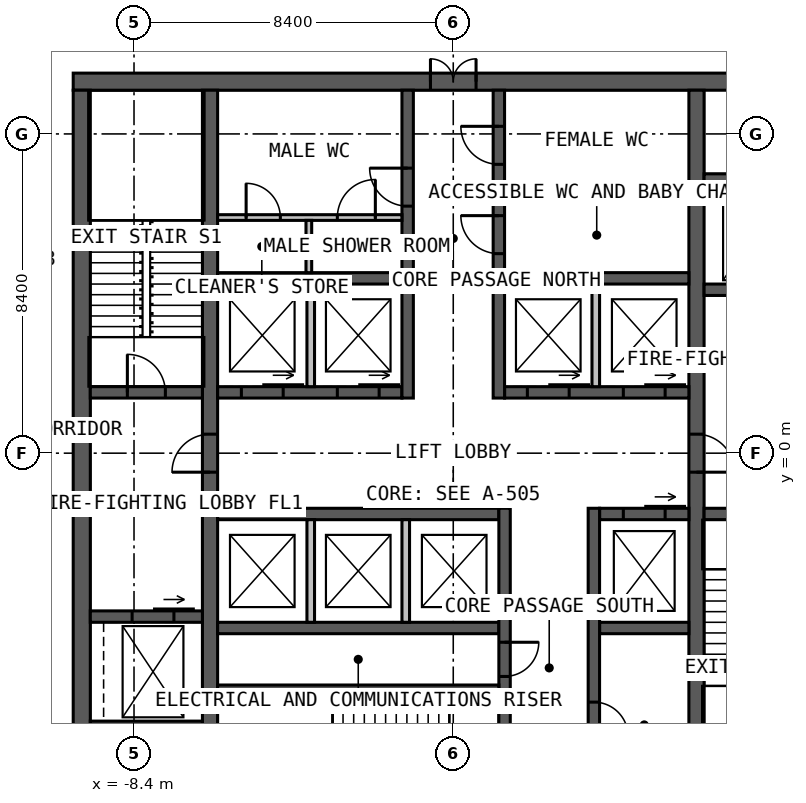
"""IFC4 building model, lengths in metres.
Left out: names, types, materials, properties, quantities, classifications, styles, units other than length and angle.
Written with IfcOpenShell. Run it as: python <this file> out.ifc"""

import sys

from ifc_helpers import new_model, si_unit, direction, frame, frame_2d, origin, place, context, subcontext, project, spatial, rectangle, extrude, element, fill, save


model = new_model("IFC4")
c1 = context("Model", 3, precision=1e-05, world=origin(), true_north=direction((0.0, 1.0)))
c2 = subcontext(c1, "Body", "Model", "MODEL_VIEW")
j1 = project(units=[si_unit("LENGTHUNIT", "METRE"), si_unit("PLANEANGLEUNIT", "RADIAN")], contexts=[c1])
p1 = place(None, origin())
s1 = spatial("IfcSite", under=j1, at=p1, CompositionType="ELEMENT")
p2 = place(p1, origin())
s2 = spatial("IfcBuilding", under=s1, at=p2, CompositionType="ELEMENT")
p3 = place(p2, frame((0.0, 0.0, 163.0)))
s3 = spatial("IfcBuildingStorey", under=s2, at=p3, CompositionType="ELEMENT", Elevation=163.0)
p4 = place(p3, frame((-10.0, 9.775, 0.0), z_axis=(0.0, 0.0, 1.0), x_axis=(1.0, 0.0, 0.0)))
e1 = element("IfcWall", 1, at=p4, inside=s3, PredefinedType="SOLIDWALL", context=c2, shape_type="SweptSolid", body=[
    extrude(rectangle(XDim=20.0, YDim=0.45, at=frame_2d((10.0, 0.0))), origin(), (0.0, 0.0, 1.0), 4.0),
])
p5 = place(p4, frame((9.4, 0.0, 0.0)))
e2 = element("IfcOpeningElement", 2, at=p5, cuts=e1, PredefinedType="OPENING", context=c2, shape_type="SweptSolid", body=[
    extrude(rectangle(XDim=1.2, YDim=2.2, at=frame_2d((0.6, 1.1))), frame((0.0, 0.235, 0.0), z_axis=(0.0, -1.0, 0.0), x_axis=(1.0, 0.0, 0.0)), (0.0, 0.0, 1.0), 0.47),
])
p6 = place(p3, frame((-9.775, 9.55, 0.0), z_axis=(0.0, 0.0, 1.0), x_axis=(0.0, -1.0, 0.0)))
e3 = element("IfcWall", 3, at=p6, inside=s3, PredefinedType="SOLIDWALL", context=c2, shape_type="SweptSolid", body=[
    extrude(rectangle(XDim=19.1, YDim=0.45, at=frame_2d((9.55, 0.0))), origin(), (0.0, 0.0, 1.0), 4.0),
])
p7 = place(p3, frame((-6.4, -9.55, 0.0), z_axis=(0.0, 0.0, 1.0), x_axis=(0.0, 1.0, 0.0)))
e4 = element("IfcWall", 4, at=p7, inside=s3, PredefinedType="SOLIDWALL", context=c2, shape_type="SweptSolid", body=[
    extrude(rectangle(XDim=19.1, YDim=0.4, at=frame_2d((9.55, 0.0))), origin(), (0.0, 0.0, 1.0), 4.0),
])
p8 = place(p7, frame((9.05, 0.0, 0.0)))
e5 = element("IfcOpeningElement", 5, at=p8, cuts=e4, PredefinedType="OPENING", context=c2, shape_type="SweptSolid", body=[
    extrude(rectangle(XDim=1.0, YDim=2.2, at=frame_2d((0.5, 1.1))), frame((0.0, 0.21, 0.0), z_axis=(0.0, -1.0, 0.0), x_axis=(1.0, 0.0, 0.0)), (0.0, 0.0, 1.0), 0.42),
])
p9 = place(p3, frame((6.4, 9.55, 0.0), z_axis=(0.0, 0.0, 1.0), x_axis=(0.0, -1.0, 0.0)))
e6 = element("IfcWall", 6, at=p9, inside=s3, PredefinedType="SOLIDWALL", context=c2, shape_type="SweptSolid", body=[
    extrude(rectangle(XDim=19.1, YDim=0.4, at=frame_2d((9.55, 0.0))), origin(), (0.0, 0.0, 1.0), 4.0),
])
p10 = place(p9, frame((9.05, 0.0, 0.0)))
e7 = element("IfcOpeningElement", 7, at=p10, cuts=e6, PredefinedType="OPENING", context=c2, shape_type="SweptSolid", body=[
    extrude(rectangle(XDim=1.0, YDim=2.2, at=frame_2d((0.5, 1.1))), frame((0.0, 0.21, 0.0), z_axis=(0.0, -1.0, 0.0), x_axis=(1.0, 0.0, 0.0)), (0.0, 0.0, 1.0), 0.42),
])
p11 = place(p3, frame((-6.2, 1.6, 0.0), z_axis=(0.0, 0.0, 1.0), x_axis=(1.0, 0.0, 0.0)))
e8 = element("IfcWall", 8, at=p11, inside=s3, PredefinedType="SOLIDWALL", context=c2, shape_type="SweptSolid", body=[
    extrude(rectangle(XDim=4.85, YDim=0.3, at=frame_2d((2.425, 0.0))), origin(), (0.0, 0.0, 1.0), 4.0),
])
p12 = place(p11, frame((0.625, 0.0, 0.0)))
e9 = element("IfcOpeningElement", 9, at=p12, cuts=e8, PredefinedType="OPENING", context=c2, shape_type="SweptSolid", body=[
    extrude(rectangle(XDim=1.1, YDim=2.2, at=frame_2d((0.55, 1.1))), frame((0.0, 0.16, 0.0), z_axis=(0.0, -1.0, 0.0), x_axis=(1.0, 0.0, 0.0)), (0.0, 0.0, 1.0), 0.32),
])
p13 = place(p11, frame((3.15, 0.0, 0.0)))
e10 = element("IfcOpeningElement", 10, at=p13, cuts=e8, PredefinedType="OPENING", context=c2, shape_type="SweptSolid", body=[
    extrude(rectangle(XDim=1.1, YDim=2.2, at=frame_2d((0.55, 1.1))), frame((0.0, 0.16, 0.0), z_axis=(0.0, -1.0, 0.0), x_axis=(1.0, 0.0, 0.0)), (0.0, 0.0, 1.0), 0.32),
])
p14 = place(p3, frame((1.35, 1.6, 0.0), z_axis=(0.0, 0.0, 1.0), x_axis=(1.0, 0.0, 0.0)))
e11 = element("IfcWall", 11, at=p14, inside=s3, PredefinedType="SOLIDWALL", context=c2, shape_type="SweptSolid", body=[
    extrude(rectangle(XDim=4.85, YDim=0.3, at=frame_2d((2.425, 0.0))), origin(), (0.0, 0.0, 1.0), 4.0),
])
p15 = place(p14, frame((0.6, 0.0, 0.0)))
e12 = element("IfcOpeningElement", 12, at=p15, cuts=e11, PredefinedType="OPENING", context=c2, shape_type="SweptSolid", body=[
    extrude(rectangle(XDim=1.1, YDim=2.2, at=frame_2d((0.55, 1.1))), frame((0.0, 0.16, 0.0), z_axis=(0.0, -1.0, 0.0), x_axis=(1.0, 0.0, 0.0)), (0.0, 0.0, 1.0), 0.32),
])
p16 = place(p14, frame((3.125, 0.0, 0.0)))
e13 = element("IfcOpeningElement", 13, at=p16, cuts=e11, PredefinedType="OPENING", context=c2, shape_type="SweptSolid", body=[
    extrude(rectangle(XDim=1.1, YDim=2.2, at=frame_2d((0.55, 1.1))), frame((0.0, 0.16, 0.0), z_axis=(0.0, -1.0, 0.0), x_axis=(1.0, 0.0, 0.0)), (0.0, 0.0, 1.0), 0.32),
])
for number, where, z_axis, x_axis in (
    (14, (-6.2, 4.6, 0.0), (0.0, 0.0, 1.0), (1.0, 0.0, 0.0)),
    (15, (1.35, 4.6, 0.0), (0.0, 0.0, 1.0), (1.0, 0.0, 0.0)),
):
    element("IfcWall", number, at=place(p3, frame(where, z_axis=z_axis, x_axis=x_axis)), inside=s3, PredefinedType="SOLIDWALL", context=c2, shape_type="SweptSolid", body=[
        extrude(rectangle(XDim=4.85, YDim=0.3, at=frame_2d((2.425, 0.0))), origin(), (0.0, 0.0, 1.0), 4.0),
    ])
p17 = place(p3, frame((-1.2, 1.45, 0.0), z_axis=(0.0, 0.0, 1.0), x_axis=(0.0, 1.0, 0.0)))
e16 = element("IfcWall", 16, at=p17, inside=s3, PredefinedType="SOLIDWALL", context=c2, shape_type="SweptSolid", body=[
    extrude(rectangle(XDim=8.1, YDim=0.3, at=frame_2d((4.05, 0.0))), origin(), (0.0, 0.0, 1.0), 4.0),
])
p18 = place(p17, frame((5.05, 0.0, 0.0)))
e17 = element("IfcOpeningElement", 17, at=p18, cuts=e16, PredefinedType="OPENING", context=c2, shape_type="SweptSolid", body=[
    extrude(rectangle(XDim=1.0, YDim=2.2, at=frame_2d((0.5, 1.1))), frame((0.0, 0.16, 0.0), z_axis=(0.0, -1.0, 0.0), x_axis=(1.0, 0.0, 0.0)), (0.0, 0.0, 1.0), 0.32),
])
p19 = place(p3, frame((1.2, 1.45, 0.0), z_axis=(0.0, 0.0, 1.0), x_axis=(0.0, 1.0, 0.0)))
e18 = element("IfcWall", 18, at=p19, inside=s3, PredefinedType="SOLIDWALL", context=c2, shape_type="SweptSolid", body=[
    extrude(rectangle(XDim=8.1, YDim=0.3, at=frame_2d((4.05, 0.0))), origin(), (0.0, 0.0, 1.0), 4.0),
])
p20 = place(p19, frame((3.8, 0.0, 0.0)))
e19 = element("IfcOpeningElement", 19, at=p20, cuts=e18, PredefinedType="OPENING", context=c2, shape_type="SweptSolid", body=[
    extrude(rectangle(XDim=1.0, YDim=2.2, at=frame_2d((0.5, 1.1))), frame((0.0, 0.16, 0.0), z_axis=(0.0, -1.0, 0.0), x_axis=(1.0, 0.0, 0.0)), (0.0, 0.0, 1.0), 0.32),
])
p21 = place(p19, frame((6.15, 0.0, 0.0)))
e20 = element("IfcOpeningElement", 20, at=p21, cuts=e18, PredefinedType="OPENING", context=c2, shape_type="SweptSolid", body=[
    extrude(rectangle(XDim=1.0, YDim=2.2, at=frame_2d((0.5, 1.1))), frame((0.0, 0.16, 0.0), z_axis=(0.0, -1.0, 0.0), x_axis=(1.0, 0.0, 0.0)), (0.0, 0.0, 1.0), 0.32),
])
p22 = place(p3, frame((-6.2, -1.6, 0.0), z_axis=(0.0, 0.0, 1.0), x_axis=(1.0, 0.0, 0.0)))
e21 = element("IfcWall", 21, at=p22, inside=s3, PredefinedType="SOLIDWALL", context=c2, shape_type="SweptSolid", body=[
    extrude(rectangle(XDim=7.4, YDim=0.3, at=frame_2d((3.7, 0.0))), origin(), (0.0, 0.0, 1.0), 4.0),
])
p23 = place(p3, frame((3.85, -1.6, 0.0), z_axis=(0.0, 0.0, 1.0), x_axis=(1.0, 0.0, 0.0)))
e22 = element("IfcWall", 22, at=p23, inside=s3, PredefinedType="SOLIDWALL", context=c2, shape_type="SweptSolid", body=[
    extrude(rectangle(XDim=2.35, YDim=0.3, at=frame_2d((1.175, 0.0))), origin(), (0.0, 0.0, 1.0), 4.0),
])
p24 = place(p23, frame((0.625, 0.0, 0.0)))
e23 = element("IfcOpeningElement", 23, at=p24, cuts=e22, PredefinedType="OPENING", context=c2, shape_type="SweptSolid", body=[
    extrude(rectangle(XDim=1.1, YDim=2.2, at=frame_2d((0.55, 1.1))), frame((0.0, 0.16, 0.0), z_axis=(0.0, -1.0, 0.0), x_axis=(1.0, 0.0, 0.0)), (0.0, 0.0, 1.0), 0.32),
])
p25 = place(p3, frame((-6.2, -4.6, 0.0), z_axis=(0.0, 0.0, 1.0), x_axis=(1.0, 0.0, 0.0)))
e24 = element("IfcWall", 24, at=p25, inside=s3, PredefinedType="SOLIDWALL", context=c2, shape_type="SweptSolid", body=[
    extrude(rectangle(XDim=7.4, YDim=0.3, at=frame_2d((3.7, 0.0))), origin(), (0.0, 0.0, 1.0), 4.0),
])
p26 = place(p3, frame((3.85, -4.6, 0.0), z_axis=(0.0, 0.0, 1.0), x_axis=(1.0, 0.0, 0.0)))
e25 = element("IfcWall", 25, at=p26, inside=s3, PredefinedType="SOLIDWALL", context=c2, shape_type="SweptSolid", body=[
    extrude(rectangle(XDim=2.35, YDim=0.3, at=frame_2d((1.175, 0.0))), origin(), (0.0, 0.0, 1.0), 4.0),
])
p27 = place(p3, frame((1.35, -1.45, 0.0), z_axis=(0.0, 0.0, 1.0), x_axis=(0.0, -1.0, 0.0)))
e26 = element("IfcWall", 26, at=p27, inside=s3, PredefinedType="SOLIDWALL", context=c2, shape_type="SweptSolid", body=[
    extrude(rectangle(XDim=8.1, YDim=0.3, at=frame_2d((4.05, 0.0))), origin(), (0.0, 0.0, 1.0), 4.0),
])
p28 = place(p27, frame((5.975, 0.0, 0.0)))
e27 = element("IfcOpeningElement", 27, at=p28, cuts=e26, PredefinedType="OPENING", context=c2, shape_type="SweptSolid", body=[
    extrude(rectangle(XDim=1.0, YDim=2.2, at=frame_2d((0.5, 1.1))), frame((0.0, 0.16, 0.0), z_axis=(0.0, -1.0, 0.0), x_axis=(1.0, 0.0, 0.0)), (0.0, 0.0, 1.0), 0.32),
])
p29 = place(p27, frame((3.525, 0.0, 0.0)))
e28 = element("IfcOpeningElement", 28, at=p29, cuts=e26, PredefinedType="OPENING", context=c2, shape_type="SweptSolid", body=[
    extrude(rectangle(XDim=0.9, YDim=2.2, at=frame_2d((0.45, 1.1))), frame((0.0, 0.16, 0.0), z_axis=(0.0, -1.0, 0.0), x_axis=(1.0, 0.0, 0.0)), (0.0, 0.0, 1.0), 0.32),
])
p30 = place(p3, frame((3.7, -1.45, 0.0), z_axis=(0.0, 0.0, 1.0), x_axis=(0.0, -1.0, 0.0)))
e29 = element("IfcWall", 29, at=p30, inside=s3, PredefinedType="SOLIDWALL", context=c2, shape_type="SweptSolid", body=[
    extrude(rectangle(XDim=8.1, YDim=0.3, at=frame_2d((4.05, 0.0))), origin(), (0.0, 0.0, 1.0), 4.0),
])
p31 = place(p30, frame((5.1, 0.0, 0.0)))
e30 = element("IfcOpeningElement", 30, at=p31, cuts=e29, PredefinedType="OPENING", context=c2, shape_type="SweptSolid", body=[
    extrude(rectangle(XDim=0.9, YDim=2.2, at=frame_2d((0.45, 1.1))), frame((0.0, 0.16, 0.0), z_axis=(0.0, -1.0, 0.0), x_axis=(1.0, 0.0, 0.0)), (0.0, 0.0, 1.0), 0.32),
])
p32 = place(p3, frame((-6.2, -6.2, 0.0), z_axis=(0.0, 0.0, 1.0), x_axis=(1.0, 0.0, 0.0)))
e31 = element("IfcWall", 31, at=p32, inside=s3, PredefinedType="SOLIDWALL", context=c2, shape_type="SweptSolid", body=[
    extrude(rectangle(XDim=7.4, YDim=0.2, at=frame_2d((3.7, 0.0))), origin(), (0.0, 0.0, 1.0), 4.0),
])
p33 = place(p3, frame((-9.55, 1.6, 0.0), z_axis=(0.0, 0.0, 1.0), x_axis=(1.0, 0.0, 0.0)))
e32 = element("IfcWall", 32, at=p33, inside=s3, PredefinedType="SOLIDWALL", context=c2, shape_type="SweptSolid", body=[
    extrude(rectangle(XDim=2.95, YDim=0.3, at=frame_2d((1.475, 0.0))), origin(), (0.0, 0.0, 1.0), 4.0),
])
p34 = place(p33, frame((0.975, 0.0, 0.0)))
e33 = element("IfcOpeningElement", 33, at=p34, cuts=e32, PredefinedType="OPENING", context=c2, shape_type="SweptSolid", body=[
    extrude(rectangle(XDim=1.0, YDim=2.2, at=frame_2d((0.5, 1.1))), frame((0.0, 0.16, 0.0), z_axis=(0.0, -1.0, 0.0), x_axis=(1.0, 0.0, 0.0)), (0.0, 0.0, 1.0), 0.32),
])
p35 = place(p3, frame((6.6, -1.6, 0.0), z_axis=(0.0, 0.0, 1.0), x_axis=(1.0, 0.0, 0.0)))
e34 = element("IfcWall", 34, at=p35, inside=s3, PredefinedType="SOLIDWALL", context=c2, shape_type="SweptSolid", body=[
    extrude(rectangle(XDim=2.95, YDim=0.3, at=frame_2d((1.475, 0.0))), origin(), (0.0, 0.0, 1.0), 4.0),
])
p36 = place(p35, frame((0.975, 0.0, 0.0)))
e35 = element("IfcOpeningElement", 35, at=p36, cuts=e34, PredefinedType="OPENING", context=c2, shape_type="SweptSolid", body=[
    extrude(rectangle(XDim=1.0, YDim=2.2, at=frame_2d((0.5, 1.1))), frame((0.0, 0.16, 0.0), z_axis=(0.0, -1.0, 0.0), x_axis=(1.0, 0.0, 0.0)), (0.0, 0.0, 1.0), 0.32),
])
p37 = place(p3, frame((-9.55, -4.3, 0.0), z_axis=(0.0, 0.0, 1.0), x_axis=(1.0, 0.0, 0.0)))
e36 = element("IfcWall", 36, at=p37, inside=s3, PredefinedType="SOLIDWALL", context=c2, shape_type="SweptSolid", body=[
    extrude(rectangle(XDim=2.95, YDim=0.3, at=frame_2d((1.475, 0.0))), origin(), (0.0, 0.0, 1.0), 4.0),
])
p38 = place(p37, frame((1.1, 0.0, 0.0)))
e37 = element("IfcOpeningElement", 37, at=p38, cuts=e36, PredefinedType="OPENING", context=c2, shape_type="SweptSolid", body=[
    extrude(rectangle(XDim=1.1, YDim=2.2, at=frame_2d((0.55, 1.1))), frame((0.0, 0.16, 0.0), z_axis=(0.0, -1.0, 0.0), x_axis=(1.0, 0.0, 0.0)), (0.0, 0.0, 1.0), 0.32),
])
p39 = place(p3, frame((6.6, 4.3, 0.0), z_axis=(0.0, 0.0, 1.0), x_axis=(1.0, 0.0, 0.0)))
e38 = element("IfcWall", 38, at=p39, inside=s3, PredefinedType="SOLIDWALL", context=c2, shape_type="SweptSolid", body=[
    extrude(rectangle(XDim=2.95, YDim=0.3, at=frame_2d((1.475, 0.0))), origin(), (0.0, 0.0, 1.0), 4.0),
])
p40 = place(p39, frame((0.75, 0.0, 0.0)))
e39 = element("IfcOpeningElement", 39, at=p40, cuts=e38, PredefinedType="OPENING", context=c2, shape_type="SweptSolid", body=[
    extrude(rectangle(XDim=1.1, YDim=2.2, at=frame_2d((0.55, 1.1))), frame((0.0, 0.16, 0.0), z_axis=(0.0, -1.0, 0.0), x_axis=(1.0, 0.0, 0.0)), (0.0, 0.0, 1.0), 0.32),
])
for number, where, z_axis, x_axis in (
    (40, (-9.55, -7.2, 0.0), (0.0, 0.0, 1.0), (1.0, 0.0, 0.0)),
    (41, (6.6, 7.2, 0.0), (0.0, 0.0, 1.0), (1.0, 0.0, 0.0)),
):
    element("IfcWall", number, at=place(p3, frame(where, z_axis=z_axis, x_axis=x_axis)), inside=s3, PredefinedType="SOLIDWALL", context=c2, shape_type="SweptSolid", body=[
        extrude(rectangle(XDim=2.95, YDim=0.3, at=frame_2d((1.475, 0.0))), origin(), (0.0, 0.0, 1.0), 4.0),
    ])
for number, where, z_axis, x_axis in (
    (42, (-3.75, 1.75, 0.0), (0.0, 0.0, 1.0), (0.0, 1.0, 0.0)),
    (43, (3.75, 1.75, 0.0), (0.0, 0.0, 1.0), (0.0, 1.0, 0.0)),
    (44, (-3.75, -1.75, 0.0), (0.0, 0.0, 1.0), (0.0, -1.0, 0.0)),
    (45, (-1.25, -1.75, 0.0), (0.0, 0.0, 1.0), (0.0, -1.0, 0.0)),
):
    element("IfcWall", number, at=place(p3, frame(where, z_axis=z_axis, x_axis=x_axis)), inside=s3, PredefinedType="SOLIDWALL", context=c2, shape_type="SweptSolid", body=[
        extrude(rectangle(XDim=2.7, YDim=0.2, at=frame_2d((1.35, 0.0))), origin(), (0.0, 0.0, 1.0), 3.75),
    ])
p41 = place(p3, frame((1.35, 6.8, 0.0), z_axis=(0.0, 0.0, 1.0), x_axis=(1.0, 0.0, 0.0)))
e46 = element("IfcWall", 46, at=p41, inside=s3, PredefinedType="PARTITIONING", context=c2, shape_type="SweptSolid", body=[
    extrude(rectangle(XDim=4.85, YDim=0.15, at=frame_2d((2.425, 0.0))), origin(), (0.0, 0.0, 1.0), 3.75),
])
p42 = place(p3, frame((-6.2, 6.2, 0.0), z_axis=(0.0, 0.0, 1.0), x_axis=(1.0, 0.0, 0.0)))
e47 = element("IfcWall", 47, at=p42, inside=s3, PredefinedType="PARTITIONING", context=c2, shape_type="SweptSolid", body=[
    extrude(rectangle(XDim=4.85, YDim=0.15, at=frame_2d((2.425, 0.0))), origin(), (0.0, 0.0, 1.0), 3.75),
])
p43 = place(p42, frame((3.15, 0.0, 0.0)))
e48 = element("IfcOpeningElement", 48, at=p43, cuts=e47, PredefinedType="OPENING", context=c2, shape_type="SweptSolid", body=[
    extrude(rectangle(XDim=1.0, YDim=2.2, at=frame_2d((0.5, 1.1))), frame((0.0, 0.085, 0.0), z_axis=(0.0, -1.0, 0.0), x_axis=(1.0, 0.0, 0.0)), (0.0, 0.0, 1.0), 0.17),
])
p44 = place(p42, frame((0.75, 0.0, 0.0)))
e49 = element("IfcOpeningElement", 49, at=p44, cuts=e47, PredefinedType="OPENING", context=c2, shape_type="SweptSolid", body=[
    extrude(rectangle(XDim=0.9, YDim=2.2, at=frame_2d((0.45, 1.1))), frame((0.0, 0.085, 0.0), z_axis=(0.0, -1.0, 0.0), x_axis=(1.0, 0.0, 0.0)), (0.0, 0.0, 1.0), 0.17),
])
p45 = place(p3, frame((-3.8, 4.75, 0.0), z_axis=(0.0, 0.0, 1.0), x_axis=(0.0, 1.0, 0.0)))
e50 = element("IfcWall", 50, at=p45, inside=s3, PredefinedType="PARTITIONING", context=c2, shape_type="SweptSolid", body=[
    extrude(rectangle(XDim=1.375, YDim=0.15, at=frame_2d((0.688, 0.0))), origin(), (0.0, 0.0, 1.0), 3.75),
])
p46 = place(p5, origin())
e51 = element("IfcDoor", 51, at=p46, inside=s3, OperationType="DOUBLE_DOOR_SINGLE_SWING", PredefinedType="DOOR", context=c2, shape_type="SweptSolid", body=[
    extrude(rectangle(XDim=1.2, YDim=2.2, at=frame_2d((0.6, 1.1))), frame((0.0, 0.025, 0.0), z_axis=(0.0, -1.0, 0.0), x_axis=(1.0, 0.0, 0.0)), (0.0, 0.0, 1.0), 0.05),
])
fill(e2, e51)
p47 = place(p8, origin())
e52 = element("IfcDoor", 52, at=p47, inside=s3, OperationType="SINGLE_SWING_LEFT", PredefinedType="DOOR", context=c2, shape_type="SweptSolid", body=[
    extrude(rectangle(XDim=1.0, YDim=2.2, at=frame_2d((0.5, 1.1))), frame((0.0, 0.025, 0.0), z_axis=(0.0, -1.0, 0.0), x_axis=(1.0, 0.0, 0.0)), (0.0, 0.0, 1.0), 0.05),
])
fill(e5, e52)
p48 = place(p10, origin())
e53 = element("IfcDoor", 53, at=p48, inside=s3, OperationType="SINGLE_SWING_RIGHT", PredefinedType="DOOR", context=c2, shape_type="SweptSolid", body=[
    extrude(rectangle(XDim=1.0, YDim=2.2, at=frame_2d((0.5, 1.1))), frame((0.0, 0.025, 0.0), z_axis=(0.0, -1.0, 0.0), x_axis=(1.0, 0.0, 0.0)), (0.0, 0.0, 1.0), 0.05),
])
fill(e7, e53)
p49 = place(p34, origin())
e54 = element("IfcDoor", 54, at=p49, inside=s3, OperationType="SINGLE_SWING_LEFT", PredefinedType="DOOR", context=c2, shape_type="SweptSolid", body=[
    extrude(rectangle(XDim=1.0, YDim=2.2, at=frame_2d((0.5, 1.1))), frame((0.0, 0.025, 0.0), z_axis=(0.0, -1.0, 0.0), x_axis=(1.0, 0.0, 0.0)), (0.0, 0.0, 1.0), 0.05),
])
fill(e33, e54)
p50 = place(p18, origin())
e55 = element("IfcDoor", 55, at=p50, inside=s3, OperationType="SINGLE_SWING_RIGHT", PredefinedType="DOOR", context=c2, shape_type="SweptSolid", body=[
    extrude(rectangle(XDim=1.0, YDim=2.2, at=frame_2d((0.5, 1.1))), frame((0.0, 0.025, 0.0), z_axis=(0.0, -1.0, 0.0), x_axis=(1.0, 0.0, 0.0)), (0.0, 0.0, 1.0), 0.05),
])
fill(e17, e55)
p51 = place(p20, origin())
e56 = element("IfcDoor", 56, at=p51, inside=s3, OperationType="SINGLE_SWING_RIGHT", PredefinedType="DOOR", context=c2, shape_type="SweptSolid", body=[
    extrude(rectangle(XDim=1.0, YDim=2.2, at=frame_2d((0.5, 1.1))), frame((0.0, 0.025, 0.0), z_axis=(0.0, -1.0, 0.0), x_axis=(1.0, 0.0, 0.0)), (0.0, 0.0, 1.0), 0.05),
])
fill(e19, e56)
p52 = place(p21, origin())
e57 = element("IfcDoor", 57, at=p52, inside=s3, OperationType="SINGLE_SWING_RIGHT", PredefinedType="DOOR", context=c2, shape_type="SweptSolid", body=[
    extrude(rectangle(XDim=1.0, YDim=2.2, at=frame_2d((0.5, 1.1))), frame((0.0, 0.025, 0.0), z_axis=(0.0, -1.0, 0.0), x_axis=(1.0, 0.0, 0.0)), (0.0, 0.0, 1.0), 0.05),
])
fill(e20, e57)
p53 = place(p29, origin())
e58 = element("IfcDoor", 58, at=p53, inside=s3, OperationType="SINGLE_SWING_LEFT", PredefinedType="DOOR", context=c2, shape_type="SweptSolid", body=[
    extrude(rectangle(XDim=0.9, YDim=2.2, at=frame_2d((0.45, 1.1))), frame((0.0, 0.025, 0.0), z_axis=(0.0, -1.0, 0.0), x_axis=(1.0, 0.0, 0.0)), (0.0, 0.0, 1.0), 0.05),
])
fill(e28, e58)
p54 = place(p31, origin())
e59 = element("IfcDoor", 59, at=p54, inside=s3, OperationType="SINGLE_SWING_RIGHT", PredefinedType="DOOR", context=c2, shape_type="SweptSolid", body=[
    extrude(rectangle(XDim=0.9, YDim=2.2, at=frame_2d((0.45, 1.1))), frame((0.0, 0.025, 0.0), z_axis=(0.0, -1.0, 0.0), x_axis=(1.0, 0.0, 0.0)), (0.0, 0.0, 1.0), 0.05),
])
fill(e30, e59)
p55 = place(p43, origin())
e60 = element("IfcDoor", 60, at=p55, inside=s3, OperationType="SINGLE_SWING_RIGHT", PredefinedType="DOOR", context=c2, shape_type="SweptSolid", body=[
    extrude(rectangle(XDim=1.0, YDim=2.2, at=frame_2d((0.5, 1.1))), frame((0.0, 0.025, 0.0), z_axis=(0.0, -1.0, 0.0), x_axis=(1.0, 0.0, 0.0)), (0.0, 0.0, 1.0), 0.05),
])
fill(e48, e60)
p56 = place(p44, origin())
e61 = element("IfcDoor", 61, at=p56, inside=s3, OperationType="SINGLE_SWING_LEFT", PredefinedType="DOOR", context=c2, shape_type="SweptSolid", body=[
    extrude(rectangle(XDim=0.9, YDim=2.2, at=frame_2d((0.45, 1.1))), frame((0.0, 0.025, 0.0), z_axis=(0.0, -1.0, 0.0), x_axis=(1.0, 0.0, 0.0)), (0.0, 0.0, 1.0), 0.05),
])
fill(e49, e61)
p57 = place(p12, origin())
e62 = element("IfcDoor", 62, at=p57, inside=s3, OperationType="SLIDING_TO_LEFT", PredefinedType="DOOR", context=c2, shape_type="SweptSolid", body=[
    extrude(rectangle(XDim=1.1, YDim=2.2, at=frame_2d((0.55, 1.1))), frame((0.0, 0.025, 0.0), z_axis=(0.0, -1.0, 0.0), x_axis=(1.0, 0.0, 0.0)), (0.0, 0.0, 1.0), 0.05),
])
fill(e9, e62)
p58 = place(p13, origin())
e63 = element("IfcDoor", 63, at=p58, inside=s3, OperationType="SLIDING_TO_LEFT", PredefinedType="DOOR", context=c2, shape_type="SweptSolid", body=[
    extrude(rectangle(XDim=1.1, YDim=2.2, at=frame_2d((0.55, 1.1))), frame((0.0, 0.025, 0.0), z_axis=(0.0, -1.0, 0.0), x_axis=(1.0, 0.0, 0.0)), (0.0, 0.0, 1.0), 0.05),
])
fill(e10, e63)
p59 = place(p15, origin())
e64 = element("IfcDoor", 64, at=p59, inside=s3, OperationType="SLIDING_TO_LEFT", PredefinedType="DOOR", context=c2, shape_type="SweptSolid", body=[
    extrude(rectangle(XDim=1.1, YDim=2.2, at=frame_2d((0.55, 1.1))), frame((0.0, 0.025, 0.0), z_axis=(0.0, -1.0, 0.0), x_axis=(1.0, 0.0, 0.0)), (0.0, 0.0, 1.0), 0.05),
])
fill(e12, e64)
p60 = place(p16, origin())
e65 = element("IfcDoor", 65, at=p60, inside=s3, OperationType="SLIDING_TO_LEFT", PredefinedType="DOOR", context=c2, shape_type="SweptSolid", body=[
    extrude(rectangle(XDim=1.1, YDim=2.2, at=frame_2d((0.55, 1.1))), frame((0.0, 0.025, 0.0), z_axis=(0.0, -1.0, 0.0), x_axis=(1.0, 0.0, 0.0)), (0.0, 0.0, 1.0), 0.05),
])
fill(e13, e65)
p61 = place(p24, origin())
e66 = element("IfcDoor", 66, at=p61, inside=s3, OperationType="SLIDING_TO_LEFT", PredefinedType="DOOR", context=c2, shape_type="SweptSolid", body=[
    extrude(rectangle(XDim=1.1, YDim=2.2, at=frame_2d((0.55, 1.1))), frame((0.0, 0.025, 0.0), z_axis=(0.0, -1.0, 0.0), x_axis=(1.0, 0.0, 0.0)), (0.0, 0.0, 1.0), 0.05),
])
fill(e23, e66)
p62 = place(p38, origin())
e67 = element("IfcDoor", 67, at=p62, inside=s3, OperationType="SLIDING_TO_LEFT", PredefinedType="DOOR", context=c2, shape_type="SweptSolid", body=[
    extrude(rectangle(XDim=1.1, YDim=2.2, at=frame_2d((0.55, 1.1))), frame((0.0, 0.025, 0.0), z_axis=(0.0, -1.0, 0.0), x_axis=(1.0, 0.0, 0.0)), (0.0, 0.0, 1.0), 0.05),
])
fill(e37, e67)
save(model, sys.argv[1])
